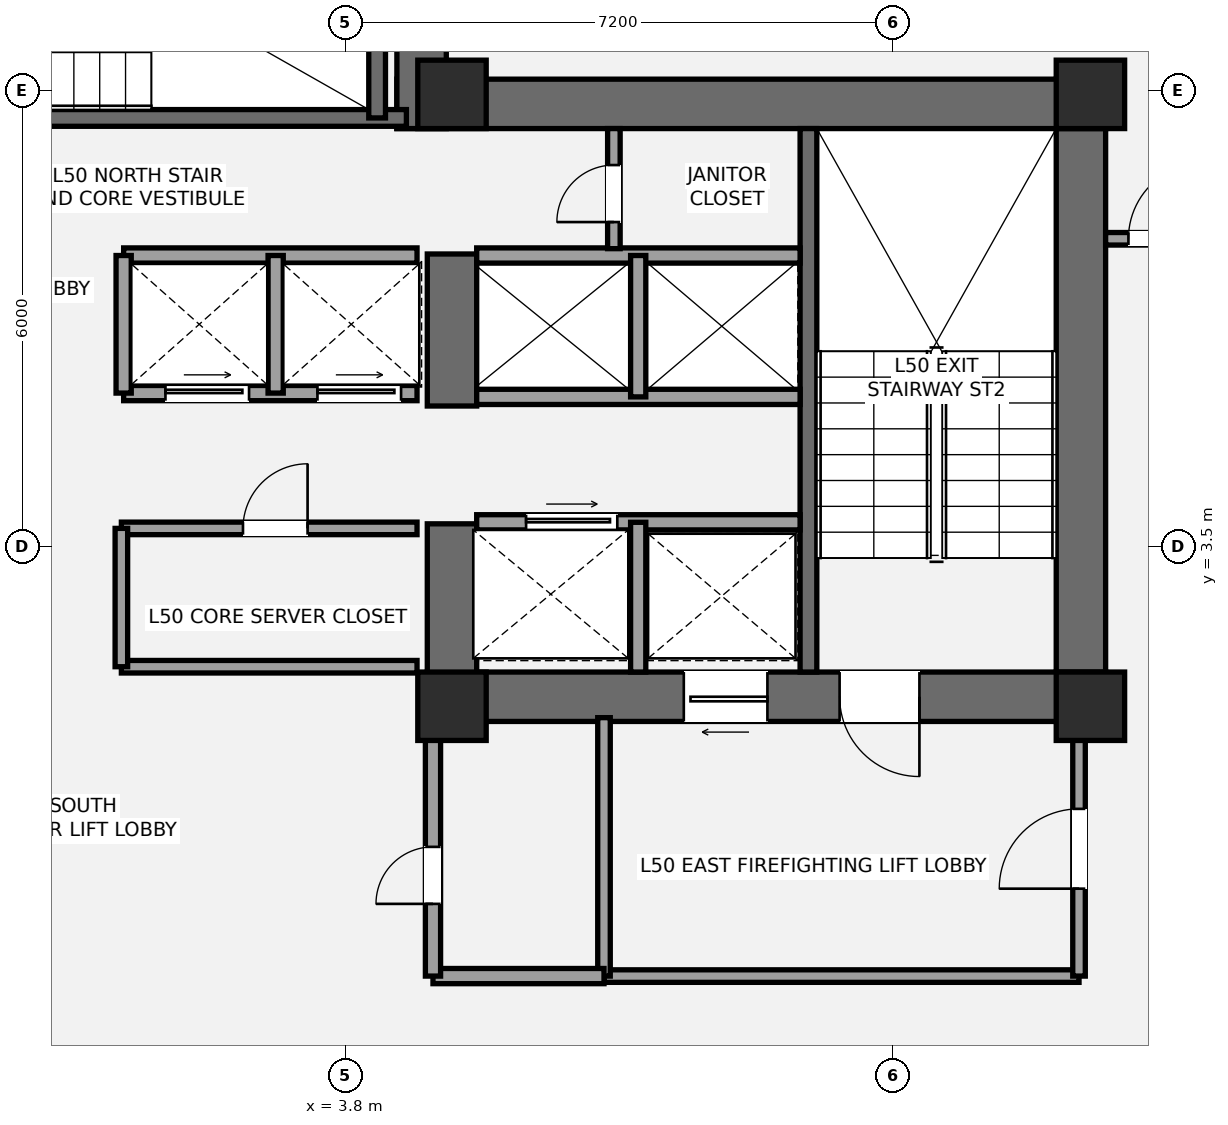
"""IFC4 building model, lengths in metres.
Left out: names, types, materials, properties, quantities, classifications, styles, units other than length and angle.
Written with IfcOpenShell. Run it as: python <this file> out.ifc"""

import sys

from ifc_helpers import new_model, si_unit, direction, frame, frame_2d, origin, origin_2d, place, context, subcontext, project, spatial, rectangle, extrude, element, fill, save


model = new_model("IFC4")
c1 = context("Model", 3, precision=1e-05, world=origin(), true_north=direction((0.0, 1.0)))
c2 = subcontext(c1, "Body", "Model", "MODEL_VIEW")
j1 = project(units=[si_unit("LENGTHUNIT", "METRE"), si_unit("PLANEANGLEUNIT", "RADIAN")], contexts=[c1])
p1 = place(None, origin())
s1 = spatial("IfcSite", under=j1, at=p1, CompositionType="ELEMENT")
p2 = place(p1, origin())
s2 = spatial("IfcBuilding", under=s1, at=p2, CompositionType="ELEMENT")
p3 = place(p2, frame((0.0, 0.0, 182.2)))
s3 = spatial("IfcBuildingStorey", under=s2, at=p3, CompositionType="ELEMENT", Elevation=182.2)
p4 = place(p3, frame((13.475, 1.2, 0.0), z_axis=(0.0, 0.0, 1.0), x_axis=(0.0, 1.0, 0.0)))
e1 = element("IfcWall", 1, at=p4, inside=s3, PredefinedType="SHEAR", context=c2, shape_type="SweptSolid", body=[
    extrude(rectangle(XDim=8.45, YDim=0.65, at=frame_2d((4.225, 0.0))), origin(), (0.0, 0.0, 1.0), 3.2),
])
p5 = place(p3, frame((4.475, 9.325, 0.0), z_axis=(0.0, 0.0, 1.0), x_axis=(1.0, 0.0, 0.0)))
e2 = element("IfcWall", 2, at=p5, inside=s3, PredefinedType="SHEAR", context=c2, shape_type="SweptSolid", body=[
    extrude(rectangle(XDim=9.325, YDim=0.65, at=frame_2d((4.663, 0.0))), origin(), (0.0, 0.0, 1.0), 3.2),
])
p6 = place(p3, frame((13.8, 1.525, 0.0), z_axis=(0.0, 0.0, 1.0), x_axis=(-1.0, 0.0, 0.0)))
e3 = element("IfcWall", 3, at=p6, inside=s3, PredefinedType="SHEAR", context=c2, shape_type="SweptSolid", body=[
    extrude(rectangle(XDim=8.925, YDim=0.65, at=frame_2d((4.462, 0.0))), origin(), (0.0, 0.0, 1.0), 3.2),
])
p7 = place(p6, frame((2.45, 0.0, 0.0)))
e4 = element("IfcOpeningElement", 4, at=p7, cuts=e3, PredefinedType="OPENING", context=c2, shape_type="SweptSolid", body=[
    extrude(rectangle(XDim=1.05, YDim=2.15, at=frame_2d((0.525, 1.075))), frame((0.0, 0.335, 0.0), z_axis=(0.0, -1.0, 0.0), x_axis=(1.0, 0.0, 0.0)), (0.0, 0.0, 1.0), 0.67),
])
p8 = place(p6, frame((4.45, 0.0, 0.0)))
e5 = element("IfcOpeningElement", 5, at=p8, cuts=e3, PredefinedType="OPENING", context=c2, shape_type="SweptSolid", body=[
    extrude(rectangle(XDim=1.1, YDim=2.2, at=frame_2d((0.55, 1.1))), frame((0.0, 0.335, 0.0), z_axis=(0.0, -1.0, 0.0), x_axis=(1.0, 0.0, 0.0)), (0.0, 0.0, 1.0), 0.67),
])
p9 = place(p3, frame((5.2, 1.2, 0.0), z_axis=(0.0, 0.0, 1.0), x_axis=(0.0, 1.0, 0.0)))
e6 = element("IfcWall", 6, at=p9, inside=s3, PredefinedType="SHEAR", context=c2, shape_type="SweptSolid", body=[
    extrude(rectangle(XDim=2.6, YDim=0.65, at=frame_2d((1.3, 0.0))), origin(), (0.0, 0.0, 1.0), 3.2),
])
p10 = place(p3, frame((5.2, 5.35, 0.0), z_axis=(0.0, 0.0, 1.0), x_axis=(0.0, 1.0, 0.0)))
e7 = element("IfcWall", 7, at=p10, inside=s3, PredefinedType="SHEAR", context=c2, shape_type="SweptSolid", body=[
    extrude(rectangle(XDim=2.0, YDim=0.65, at=frame_2d((1.0, 0.0))), origin(), (0.0, 0.0, 1.0), 3.2),
])
p11 = place(p3, frame((9.89, 1.85, 0.0), z_axis=(0.0, 0.0, 1.0), x_axis=(0.0, 1.0, 0.0)))
e8 = element("IfcWall", 8, at=p11, inside=s3, PredefinedType="SHEAR", context=c2, shape_type="SweptSolid", body=[
    extrude(rectangle(XDim=7.15, YDim=0.22, at=frame_2d((3.575, 0.0))), origin(), (0.0, 0.0, 1.0), 3.2),
])
p12 = place(p3, frame((4.8, 9.0, 0.0), z_axis=(0.0, 0.0, 1.0), x_axis=(0.0, 1.0, 0.0)))
e9 = element("IfcWall", 9, at=p12, inside=s3, PredefinedType="SHEAR", context=c2, shape_type="SweptSolid", body=[
    extrude(rectangle(XDim=4.05, YDim=0.65, at=frame_2d((2.025, 0.0))), origin(), (0.0, 0.0, 1.0), 3.2),
])
p13 = place(p3, frame((-4.7, 9.14, 0.0), z_axis=(0.0, 0.0, 1.0), x_axis=(1.0, 0.0, 0.0)))
e10 = element("IfcWall", 10, at=p13, inside=s3, PredefinedType="SHEAR", context=c2, shape_type="SweptSolid", body=[
    extrude(rectangle(XDim=9.3, YDim=0.22, at=frame_2d((4.65, 0.0))), origin(), (0.0, 0.0, 1.0), 3.2),
])
p14 = place(p13, frame((1.15, 0.0, 0.0)))
e11 = element("IfcOpeningElement", 11, at=p14, cuts=e10, PredefinedType="OPENING", context=c2, shape_type="SweptSolid", body=[
    extrude(rectangle(XDim=1.05, YDim=2.15, at=frame_2d((0.525, 1.075))), frame((0.0, 0.12, 0.0), z_axis=(0.0, -1.0, 0.0), x_axis=(1.0, 0.0, 0.0)), (0.0, 0.0, 1.0), 0.24),
])
p15 = place(p3, frame((4.215, 9.14, 0.0), z_axis=(0.0, 0.0, 1.0), x_axis=(0.0, 1.0, 0.0)))
e12 = element("IfcWall", 12, at=p15, inside=s3, PredefinedType="SHEAR", context=c2, shape_type="SweptSolid", body=[
    extrude(rectangle(XDim=3.26, YDim=0.22, at=frame_2d((1.63, 0.0))), origin(), (0.0, 0.0, 1.0), 3.2),
])
for number, where, z_axis, x_axis in (
    (13, (5.2, 1.4, 0.0), (0.0, 0.0, 1.0), (1.0, 0.0, 0.0)),
    (14, (5.2, 9.45, 0.0), (0.0, 0.0, 1.0), (1.0, 0.0, 0.0)),
    (15, (13.6, 1.4, 0.0), (0.0, 0.0, 1.0), (1.0, 0.0, 0.0)),
    (16, (13.6, 9.45, 0.0), (0.0, 0.0, 1.0), (1.0, 0.0, 0.0)),
):
    element("IfcColumn", number, at=place(p3, frame(where, z_axis=z_axis, x_axis=x_axis)), inside=s3, PredefinedType="COLUMN", context=c2, shape_type="SweptSolid", body=[
        extrude(rectangle(XDim=0.9, YDim=0.9, at=origin_2d()), origin(), (0.0, 0.0, 1.0), 3.2),
    ])
p16 = place(p3, frame((7.2, -2.15, 0.0), z_axis=(0.0, 0.0, 1.0), x_axis=(1.0, 0.0, 0.0)))
e17 = element("IfcWall", 17, at=p16, inside=s3, PredefinedType="PARTITIONING", context=c2, shape_type="SweptSolid", body=[
    extrude(rectangle(XDim=6.25, YDim=0.165, at=frame_2d((3.125, 0.0))), origin(), (0.0, 0.0, 1.0), 3.02),
])
p17 = place(p3, frame((7.2, -2.15, 0.0), z_axis=(0.0, 0.0, 1.0), x_axis=(0.0, 1.0, 0.0)))
e18 = element("IfcWall", 18, at=p17, inside=s3, PredefinedType="PARTITIONING", context=c2, shape_type="SweptSolid", body=[
    extrude(rectangle(XDim=3.4, YDim=0.165, at=frame_2d((1.7, 0.0))), origin(), (0.0, 0.0, 1.0), 2.473),
])
p18 = place(p3, frame((13.45, -2.15, 0.0), z_axis=(0.0, 0.0, 1.0), x_axis=(0.0, 1.0, 0.0)))
e19 = element("IfcWall", 19, at=p18, inside=s3, PredefinedType="PARTITIONING", context=c2, shape_type="SweptSolid", body=[
    extrude(rectangle(XDim=3.4, YDim=0.165, at=frame_2d((1.7, 0.0))), origin(), (0.0, 0.0, 1.0), 2.473),
])
p19 = place(p18, frame((1.15, 0.0, 0.0)))
e20 = element("IfcOpeningElement", 20, at=p19, cuts=e19, PredefinedType="OPENING", context=c2, shape_type="SweptSolid", body=[
    extrude(rectangle(XDim=1.05, YDim=2.15, at=frame_2d((0.525, 1.075))), frame((0.0, 0.093, 0.0), z_axis=(0.0, -1.0, 0.0), x_axis=(1.0, 0.0, 0.0)), (0.0, 0.0, 1.0), 0.185),
])
p20 = place(p3, frame((4.95, -2.15, 0.0), z_axis=(0.0, 0.0, 1.0), x_axis=(1.0, 0.0, 0.0)))
e21 = element("IfcWall", 21, at=p20, inside=s3, PredefinedType="SOLIDWALL", context=c2, shape_type="SweptSolid", body=[
    extrude(rectangle(XDim=2.25, YDim=0.2, at=frame_2d((1.125, 0.0))), origin(), (0.0, 0.0, 1.0), 3.02),
])
p21 = place(p3, frame((4.95, -2.15, 0.0), z_axis=(0.0, 0.0, 1.0), x_axis=(0.0, 1.0, 0.0)))
e22 = element("IfcWall", 22, at=p21, inside=s3, PredefinedType="SOLIDWALL", context=c2, shape_type="SweptSolid", body=[
    extrude(rectangle(XDim=3.4, YDim=0.2, at=frame_2d((1.7, 0.0))), origin(), (0.0, 0.0, 1.0), 2.473),
])
p22 = place(p21, frame((0.95, 0.0, 0.0)))
e23 = element("IfcOpeningElement", 23, at=p22, cuts=e22, PredefinedType="OPENING", context=c2, shape_type="SweptSolid", body=[
    extrude(rectangle(XDim=0.75, YDim=2.1, at=frame_2d((0.375, 1.05))), frame((0.0, 0.11, 0.0), z_axis=(0.0, -1.0, 0.0), x_axis=(1.0, 0.0, 0.0)), (0.0, 0.0, 1.0), 0.22),
])
p23 = place(p3, frame((5.525, 3.82, 0.0), z_axis=(0.0, 0.0, 1.0), x_axis=(1.0, 0.0, 0.0)))
e24 = element("IfcWall", 24, at=p23, inside=s3, PredefinedType="SOLIDWALL", context=c2, shape_type="SweptSolid", body=[
    extrude(rectangle(XDim=4.255, YDim=0.2, at=frame_2d((2.127, 0.0))), origin(), (0.0, 0.0, 1.0), 3.02),
])
p24 = place(p23, frame((0.65, 0.0, 0.0)))
e25 = element("IfcOpeningElement", 25, at=p24, cuts=e24, PredefinedType="OPENING", context=c2, shape_type="SweptSolid", body=[
    extrude(rectangle(XDim=1.2, YDim=2.2, at=frame_2d((0.6, 1.1))), frame((0.0, 0.11, 0.0), z_axis=(0.0, -1.0, 0.0), x_axis=(1.0, 0.0, 0.0)), (0.0, 0.0, 1.0), 0.22),
])
p25 = place(p3, frame((7.65, 1.85, 0.0), z_axis=(0.0, 0.0, 1.0), x_axis=(0.0, 1.0, 0.0)))
e26 = element("IfcWall", 26, at=p25, inside=s3, PredefinedType="SOLIDWALL", context=c2, shape_type="SweptSolid", body=[
    extrude(rectangle(XDim=1.97, YDim=0.2, at=frame_2d((0.985, 0.0))), origin(), (0.0, 0.0, 1.0), 3.02),
])
for number, where, z_axis, x_axis in (
    (27, (5.525, 5.47, 0.0), (0.0, 0.0, 1.0), (1.0, 0.0, 0.0)),
    (28, (5.525, 7.33, 0.0), (0.0, 0.0, 1.0), (1.0, 0.0, 0.0)),
):
    element("IfcWall", number, at=place(p3, frame(where, z_axis=z_axis, x_axis=x_axis)), inside=s3, PredefinedType="SOLIDWALL", context=c2, shape_type="SweptSolid", body=[
        extrude(rectangle(XDim=4.255, YDim=0.2, at=frame_2d((2.127, 0.0))), origin(), (0.0, 0.0, 1.0), 3.02),
    ])
p26 = place(p3, frame((7.65, 5.47, 0.0), z_axis=(0.0, 0.0, 1.0), x_axis=(0.0, 1.0, 0.0)))
e29 = element("IfcWall", 29, at=p26, inside=s3, PredefinedType="SOLIDWALL", context=c2, shape_type="SweptSolid", body=[
    extrude(rectangle(XDim=1.86, YDim=0.2, at=frame_2d((0.93, 0.0))), origin(), (0.0, 0.0, 1.0), 3.02),
])
p27 = place(p3, frame((0.85, 1.92, 0.0), z_axis=(0.0, 0.0, 1.0), x_axis=(1.0, 0.0, 0.0)))
e30 = element("IfcWall", 30, at=p27, inside=s3, PredefinedType="PARTITIONING", context=c2, shape_type="SweptSolid", body=[
    extrude(rectangle(XDim=3.89, YDim=0.165, at=frame_2d((1.945, 0.0))), origin(), (0.0, 0.0, 1.0), 2.16),
])
p28 = place(p3, frame((0.85, 3.74, 0.0), z_axis=(0.0, 0.0, 1.0), x_axis=(1.0, 0.0, 0.0)))
e31 = element("IfcWall", 31, at=p28, inside=s3, PredefinedType="PARTITIONING", context=c2, shape_type="SweptSolid", body=[
    extrude(rectangle(XDim=3.89, YDim=0.165, at=frame_2d((1.945, 0.0))), origin(), (0.0, 0.0, 1.0), 3.02),
])
p29 = place(p28, frame((1.6, 0.0, 0.0)))
e32 = element("IfcOpeningElement", 32, at=p29, cuts=e31, PredefinedType="OPENING", context=c2, shape_type="SweptSolid", body=[
    extrude(rectangle(XDim=0.85, YDim=2.1, at=frame_2d((0.425, 1.05))), frame((0.0, 0.093, 0.0), z_axis=(0.0, -1.0, 0.0), x_axis=(1.0, 0.0, 0.0)), (0.0, 0.0, 1.0), 0.185),
])
p30 = place(p3, frame((0.85, 1.92, 0.0), z_axis=(0.0, 0.0, 1.0), x_axis=(0.0, 1.0, 0.0)))
e33 = element("IfcWall", 33, at=p30, inside=s3, PredefinedType="PARTITIONING", context=c2, shape_type="SweptSolid", body=[
    extrude(rectangle(XDim=1.82, YDim=0.165, at=frame_2d((0.91, 0.0))), origin(), (0.0, 0.0, 1.0), 3.02),
])
p31 = place(p3, frame((0.88, 5.52, 0.0), z_axis=(0.0, 0.0, 1.0), x_axis=(1.0, 0.0, 0.0)))
e34 = element("IfcWall", 34, at=p31, inside=s3, PredefinedType="SOLIDWALL", context=c2, shape_type="SweptSolid", body=[
    extrude(rectangle(XDim=3.86, YDim=0.2, at=frame_2d((1.93, 0.0))), origin(), (0.0, 0.0, 1.0), 3.02),
])
p32 = place(p31, frame((0.55, 0.0, 0.0)))
e35 = element("IfcOpeningElement", 35, at=p32, cuts=e34, PredefinedType="OPENING", context=c2, shape_type="SweptSolid", body=[
    extrude(rectangle(XDim=1.1, YDim=2.2, at=frame_2d((0.55, 1.1))), frame((0.0, 0.11, 0.0), z_axis=(0.0, -1.0, 0.0), x_axis=(1.0, 0.0, 0.0)), (0.0, 0.0, 1.0), 0.22),
])
p33 = place(p31, frame((2.55, 0.0, 0.0)))
e36 = element("IfcOpeningElement", 36, at=p33, cuts=e34, PredefinedType="OPENING", context=c2, shape_type="SweptSolid", body=[
    extrude(rectangle(XDim=1.1, YDim=2.2, at=frame_2d((0.55, 1.1))), frame((0.0, 0.11, 0.0), z_axis=(0.0, -1.0, 0.0), x_axis=(1.0, 0.0, 0.0)), (0.0, 0.0, 1.0), 0.22),
])
p34 = place(p3, frame((0.88, 7.33, 0.0), z_axis=(0.0, 0.0, 1.0), x_axis=(1.0, 0.0, 0.0)))
e37 = element("IfcWall", 37, at=p34, inside=s3, PredefinedType="SOLIDWALL", context=c2, shape_type="SweptSolid", body=[
    extrude(rectangle(XDim=3.86, YDim=0.2, at=frame_2d((1.93, 0.0))), origin(), (0.0, 0.0, 1.0), 3.02),
])
for number, where, z_axis, x_axis in (
    (38, (2.88, 5.52, 0.0), (0.0, 0.0, 1.0), (0.0, 1.0, 0.0)),
    (39, (0.88, 5.52, 0.0), (0.0, 0.0, 1.0), (0.0, 1.0, 0.0)),
):
    element("IfcWall", number, at=place(p3, frame(where, z_axis=z_axis, x_axis=x_axis)), inside=s3, PredefinedType="SOLIDWALL", context=c2, shape_type="SweptSolid", body=[
        extrude(rectangle(XDim=1.81, YDim=0.2, at=frame_2d((0.905, 0.0))), origin(), (0.0, 0.0, 1.0), 3.02),
    ])
p35 = place(p3, frame((7.33, 7.42, 0.0), z_axis=(0.0, 0.0, 1.0), x_axis=(0.0, 1.0, 0.0)))
e40 = element("IfcWall", 40, at=p35, inside=s3, PredefinedType="PARTITIONING", context=c2, shape_type="SweptSolid", body=[
    extrude(rectangle(XDim=1.58, YDim=0.165, at=frame_2d((0.79, 0.0))), origin(), (0.0, 0.0, 1.0), 3.02),
])
p36 = place(p35, frame((0.35, 0.0, 0.0)))
e41 = element("IfcOpeningElement", 41, at=p36, cuts=e40, PredefinedType="OPENING", context=c2, shape_type="SweptSolid", body=[
    extrude(rectangle(XDim=0.75, YDim=2.1, at=frame_2d((0.375, 1.05))), frame((0.0, 0.093, 0.0), z_axis=(0.0, -1.0, 0.0), x_axis=(1.0, 0.0, 0.0)), (0.0, 0.0, 1.0), 0.185),
])
p37 = place(p3, frame((13.8, 7.55, 0.0), z_axis=(0.0, 0.0, 1.0), x_axis=(1.0, 0.0, 0.0)))
e42 = element("IfcWall", 42, at=p37, inside=s3, PredefinedType="PARTITIONING", context=c2, shape_type="SweptSolid", body=[
    extrude(rectangle(XDim=1.75, YDim=0.165, at=frame_2d((0.875, 0.0))), origin(), (0.0, 0.0, 1.0), 3.02),
])
p38 = place(p37, frame((0.3, 0.0, 0.0)))
e43 = element("IfcOpeningElement", 43, at=p38, cuts=e42, PredefinedType="OPENING", context=c2, shape_type="SweptSolid", body=[
    extrude(rectangle(XDim=1.0, YDim=2.15, at=frame_2d((0.5, 1.075))), frame((0.0, 0.093, 0.0), z_axis=(0.0, -1.0, 0.0), x_axis=(1.0, 0.0, 0.0)), (0.0, 0.0, 1.0), 0.185),
])
p39 = place(p7, origin())
e44 = element("IfcDoor", 44, at=p39, inside=s3, OperationType="SINGLE_SWING_LEFT", PredefinedType="DOOR", context=c2, shape_type="SweptSolid", body=[
    extrude(rectangle(XDim=1.05, YDim=2.15, at=frame_2d((0.525, 1.075))), frame((0.0, 0.025, 0.0), z_axis=(0.0, -1.0, 0.0), x_axis=(1.0, 0.0, 0.0)), (0.0, 0.0, 1.0), 0.05),
])
fill(e4, e44)
p40 = place(p19, origin())
e45 = element("IfcDoor", 45, at=p40, inside=s3, OperationType="SINGLE_SWING_LEFT", PredefinedType="DOOR", context=c2, shape_type="SweptSolid", body=[
    extrude(rectangle(XDim=1.05, YDim=2.15, at=frame_2d((0.525, 1.075))), frame((0.0, 0.025, 0.0), z_axis=(0.0, -1.0, 0.0), x_axis=(1.0, 0.0, 0.0)), (0.0, 0.0, 1.0), 0.05),
])
fill(e20, e45)
p41 = place(p22, origin())
e46 = element("IfcDoor", 46, at=p41, inside=s3, OperationType="SINGLE_SWING_LEFT", PredefinedType="DOOR", context=c2, shape_type="SweptSolid", body=[
    extrude(rectangle(XDim=0.75, YDim=2.1, at=frame_2d((0.375, 1.05))), frame((0.0, 0.025, 0.0), z_axis=(0.0, -1.0, 0.0), x_axis=(1.0, 0.0, 0.0)), (0.0, 0.0, 1.0), 0.05),
])
fill(e23, e46)
p42 = place(p8, origin())
e47 = element("IfcDoor", 47, at=p42, inside=s3, OperationType="SLIDING_TO_LEFT", PredefinedType="DOOR", context=c2, shape_type="SweptSolid", body=[
    extrude(rectangle(XDim=1.1, YDim=2.2, at=frame_2d((0.55, 1.1))), frame((0.0, 0.025, 0.0), z_axis=(0.0, -1.0, 0.0), x_axis=(1.0, 0.0, 0.0)), (0.0, 0.0, 1.0), 0.05),
])
fill(e5, e47)
p43 = place(p24, origin())
e48 = element("IfcDoor", 48, at=p43, inside=s3, OperationType="SLIDING_TO_RIGHT", PredefinedType="DOOR", context=c2, shape_type="SweptSolid", body=[
    extrude(rectangle(XDim=1.2, YDim=2.2, at=frame_2d((0.6, 1.1))), frame((0.0, 0.025, 0.0), z_axis=(0.0, -1.0, 0.0), x_axis=(1.0, 0.0, 0.0)), (0.0, 0.0, 1.0), 0.05),
])
fill(e25, e48)
p44 = place(p29, origin())
e49 = element("IfcDoor", 49, at=p44, inside=s3, OperationType="SINGLE_SWING_RIGHT", PredefinedType="DOOR", context=c2, shape_type="SweptSolid", body=[
    extrude(rectangle(XDim=0.85, YDim=2.1, at=frame_2d((0.425, 1.05))), frame((0.0, 0.025, 0.0), z_axis=(0.0, -1.0, 0.0), x_axis=(1.0, 0.0, 0.0)), (0.0, 0.0, 1.0), 0.05),
])
fill(e32, e49)
p45 = place(p32, origin())
e50 = element("IfcDoor", 50, at=p45, inside=s3, OperationType="SLIDING_TO_LEFT", PredefinedType="DOOR", context=c2, shape_type="SweptSolid", body=[
    extrude(rectangle(XDim=1.1, YDim=2.2, at=frame_2d((0.55, 1.1))), frame((0.0, 0.025, 0.0), z_axis=(0.0, -1.0, 0.0), x_axis=(1.0, 0.0, 0.0)), (0.0, 0.0, 1.0), 0.05),
])
fill(e35, e50)
p46 = place(p33, origin())
e51 = element("IfcDoor", 51, at=p46, inside=s3, OperationType="SLIDING_TO_LEFT", PredefinedType="DOOR", context=c2, shape_type="SweptSolid", body=[
    extrude(rectangle(XDim=1.1, YDim=2.2, at=frame_2d((0.55, 1.1))), frame((0.0, 0.025, 0.0), z_axis=(0.0, -1.0, 0.0), x_axis=(1.0, 0.0, 0.0)), (0.0, 0.0, 1.0), 0.05),
])
fill(e36, e51)
p47 = place(p36, origin())
e52 = element("IfcDoor", 52, at=p47, inside=s3, OperationType="SINGLE_SWING_LEFT", PredefinedType="DOOR", context=c2, shape_type="SweptSolid", body=[
    extrude(rectangle(XDim=0.75, YDim=2.1, at=frame_2d((0.375, 1.05))), frame((0.0, 0.025, 0.0), z_axis=(0.0, -1.0, 0.0), x_axis=(1.0, 0.0, 0.0)), (0.0, 0.0, 1.0), 0.05),
])
fill(e41, e52)
p48 = place(p38, origin())
e53 = element("IfcDoor", 53, at=p48, inside=s3, OperationType="SINGLE_SWING_RIGHT", PredefinedType="DOOR", context=c2, shape_type="SweptSolid", body=[
    extrude(rectangle(XDim=1.0, YDim=2.15, at=frame_2d((0.5, 1.075))), frame((0.0, 0.025, 0.0), z_axis=(0.0, -1.0, 0.0), x_axis=(1.0, 0.0, 0.0)), (0.0, 0.0, 1.0), 0.05),
])
fill(e43, e53)
save(model, sys.argv[1])
